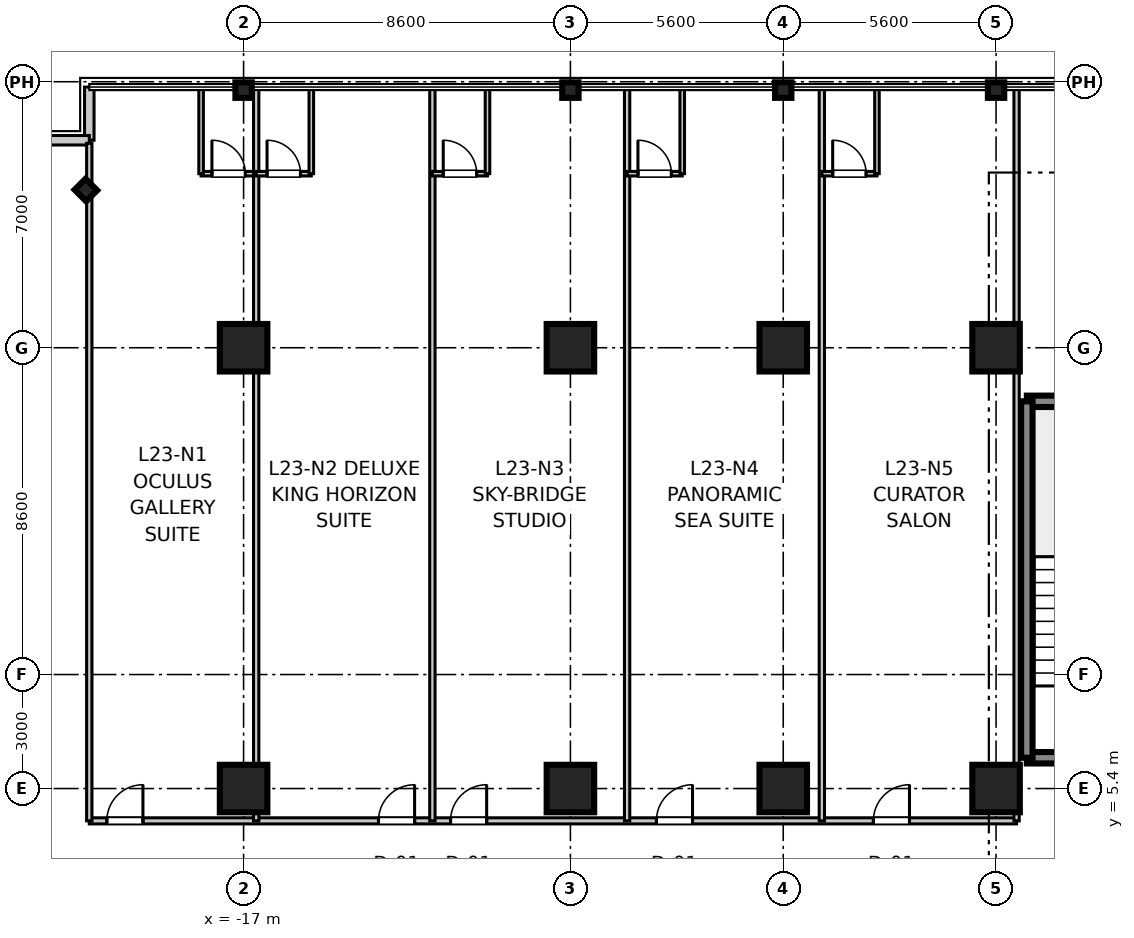
"""IFC4 building model, lengths in metres.
Left out: names, types, materials, properties, quantities, classifications, styles, units other than length and angle.
Written with IfcOpenShell. Run it as: python <this file> out.ifc"""

import sys

from ifc_helpers import new_model, si_unit, direction, frame, frame_2d, origin, origin_2d, place, context, subcontext, project, spatial, rectangle, i_section, extrude, source, transform, mapped, element, fill, save


model = new_model("IFC4")
c1 = context("Model", 3, precision=1e-05, world=origin(), true_north=direction((0.0, 1.0)))
c2 = subcontext(c1, "Body", "Model", "MODEL_VIEW")
j1 = project(units=[si_unit("LENGTHUNIT", "METRE"), si_unit("PLANEANGLEUNIT", "RADIAN")], contexts=[c1])
p1 = place(None, origin())
s1 = spatial("IfcSite", under=j1, at=p1, CompositionType="ELEMENT")
p2 = place(p1, origin())
s2 = spatial("IfcBuilding", under=s1, at=p2, CompositionType="ELEMENT")
p3 = place(p2, frame((0.0, 0.0, 95.6)))
s3 = spatial("IfcBuildingStorey", under=s2, at=p3, CompositionType="ELEMENT", Elevation=95.6)
m1 = source(origin(), c2, "Body", "SweptSolid", [
    extrude(rectangle(XDim=1.25, YDim=1.25, at=origin_2d()), origin(), (0.0, 0.0, 1.0), 3.605),
])
for number, where, z_axis, x_axis in (
    (1, (-17.0, 5.4, 0.0), (0.0, 0.0, 1.0), (1.0, 0.0, 0.0)),
    (2, (-17.0, 17.0, 0.0), (0.0, 0.0, 1.0), (1.0, 0.0, 0.0)),
    (3, (-8.4, 5.4, 0.0), (0.0, 0.0, 1.0), (1.0, 0.0, 0.0)),
    (4, (-8.4, 17.0, 0.0), (0.0, 0.0, 1.0), (1.0, 0.0, 0.0)),
    (5, (-2.8, 5.4, 0.0), (0.0, 0.0, 1.0), (1.0, 0.0, 0.0)),
    (6, (-2.8, 17.0, 0.0), (0.0, 0.0, 1.0), (1.0, 0.0, 0.0)),
    (7, (2.8, 5.4, 0.0), (0.0, 0.0, 1.0), (1.0, 0.0, 0.0)),
    (8, (2.8, 17.0, 0.0), (0.0, 0.0, 1.0), (1.0, 0.0, 0.0)),
):
    element("IfcColumn", number, at=place(p3, frame(where, z_axis=z_axis, x_axis=x_axis)), inside=s3, PredefinedType="COLUMN", context=c2, shape_type="MappedRepresentation", body=[
        mapped(m1, transform((0.0, 0.0, 0.0), scale=1.0)),
    ])
m2 = source(origin(), c2, "Body", "SweptSolid", [
    extrude(i_section(OverallWidth=0.409, OverallDepth=0.43, WebThickness=0.021, FlangeThickness=0.034, at=origin_2d()), origin(), (0.0, 0.0, 1.0), 3.605),
])
for number, where, z_axis, x_axis in (
    (9, (-17.0, 23.78, 0.0), (0.0, 0.0, 1.0), (0.0, 1.0, 0.0)),
    (10, (-8.4, 23.78, 0.0), (0.0, 0.0, 1.0), (0.0, 1.0, 0.0)),
    (11, (-2.8, 23.78, 0.0), (0.0, 0.0, 1.0), (0.0, 1.0, 0.0)),
    (12, (2.8, 23.78, 0.0), (0.0, 0.0, 1.0), (0.0, 1.0, 0.0)),
    (13, (-21.15, 21.15, 0.0), (0.0, 0.0, 1.0), (0.707, 0.707, 0.0)),
):
    element("IfcColumn", number, at=place(p3, frame(where, z_axis=z_axis, x_axis=x_axis)), inside=s3, PredefinedType="COLUMN", context=c2, shape_type="MappedRepresentation", body=[
        mapped(m2, transform((0.0, 0.0, 0.0), scale=1.0)),
    ])
m3 = source(origin(), c2, "Body", "SweptSolid", [
    extrude(rectangle(XDim=3.98, YDim=0.3, at=frame_2d((1.99, 0.0))), origin(), (0.0, 0.0, 1.0), 3.38),
])
for number, where, z_axis, x_axis in (
    (14, (3.61, 6.21, 0.0), (0.0, 0.0, 1.0), (1.0, 0.0, 0.0)),
    (15, (3.61, 15.59, 0.0), (0.0, 0.0, 1.0), (1.0, 0.0, 0.0)),
):
    element("IfcWall", number, at=place(p3, frame(where, z_axis=z_axis, x_axis=x_axis)), inside=s3, PredefinedType="SHEAR", context=c2, shape_type="MappedRepresentation", body=[
        mapped(m3, transform((0.0, 0.0, 0.0), scale=1.0)),
    ])
m4 = source(origin(), c2, "Body", "SweptSolid", [
    extrude(rectangle(XDim=9.38, YDim=0.3, at=frame_2d((4.69, 0.0))), origin(), (0.0, 0.0, 1.0), 3.38),
])
p4 = place(p3, frame((3.61, 6.21, 0.0), z_axis=(0.0, 0.0, 1.0), x_axis=(0.0, 1.0, 0.0)))
e16 = element("IfcWall", 16, at=p4, inside=s3, PredefinedType="SHEAR", context=c2, shape_type="MappedRepresentation", body=[
    mapped(m4, transform((0.0, 0.0, 0.0), scale=1.0)),
])
m5 = source(origin(), c2, "Body", "SweptSolid", [
    extrude(rectangle(XDim=1.4, YDim=0.25, at=frame_2d((0.7, 0.0))), origin(), (0.0, 0.0, 1.0), 3.38),
])
p5 = place(p3, frame((-21.06, 22.46, 0.0), z_axis=(0.0, 0.0, 1.0), x_axis=(0.0, 1.0, 0.0)))
e17 = element("IfcWall", 17, at=p5, inside=s3, PredefinedType="STANDARD", context=c2, shape_type="MappedRepresentation", body=[
    mapped(m5, transform((0.0, 0.0, 0.0), scale=1.0)),
])
m6 = source(origin(), c2, "Body", "SweptSolid", [
    extrude(rectangle(XDim=1.4, YDim=0.25, at=frame_2d((0.7, 0.0))), origin(), (0.0, 0.0, 1.0), 3.38),
])
p6 = place(p3, frame((-22.46, 22.46, 0.0), z_axis=(0.0, 0.0, 1.0), x_axis=(1.0, 0.0, 0.0)))
e18 = element("IfcWall", 18, at=p6, inside=s3, PredefinedType="STANDARD", context=c2, shape_type="MappedRepresentation", body=[
    mapped(m6, transform((0.0, 0.0, 0.0), scale=1.0)),
])
m7 = source(origin(), c2, "Body", "SweptSolid", [
    extrude(rectangle(XDim=24.4, YDim=0.16, at=frame_2d((12.2, 0.0))), origin(), (0.0, 0.0, 1.0), 2.72),
])
p7 = place(p3, frame((-21.06, 4.55, 0.0), z_axis=(0.0, 0.0, 1.0), x_axis=(1.0, 0.0, 0.0)))
e19 = element("IfcWall", 19, at=p7, inside=s3, PredefinedType="PARTITIONING", context=c2, shape_type="MappedRepresentation", body=[
    mapped(m7, transform((0.0, 0.0, 0.0), scale=1.0)),
])
p8 = place(p7, frame((0.462, 0.0, 0.0)))
e20 = element("IfcOpeningElement", 20, at=p8, cuts=e19, PredefinedType="OPENING", context=c2, shape_type="SweptSolid", body=[
    extrude(rectangle(XDim=0.95, YDim=2.1, at=frame_2d((0.475, 1.05))), frame((0.0, 0.09, 0.0), z_axis=(0.0, -1.0, 0.0), x_axis=(1.0, 0.0, 0.0)), (0.0, 0.0, 1.0), 0.18),
])
p9 = place(p7, frame((7.61, 0.0, 0.0)))
e21 = element("IfcOpeningElement", 21, at=p9, cuts=e19, PredefinedType="OPENING", context=c2, shape_type="SweptSolid", body=[
    extrude(rectangle(XDim=0.95, YDim=2.1, at=frame_2d((0.475, 1.05))), frame((0.0, 0.09, 0.0), z_axis=(0.0, -1.0, 0.0), x_axis=(1.0, 0.0, 0.0)), (0.0, 0.0, 1.0), 0.18),
])
p10 = place(p7, frame((9.506, 0.0, 0.0)))
e22 = element("IfcOpeningElement", 22, at=p10, cuts=e19, PredefinedType="OPENING", context=c2, shape_type="SweptSolid", body=[
    extrude(rectangle(XDim=0.95, YDim=2.1, at=frame_2d((0.475, 1.05))), frame((0.0, 0.09, 0.0), z_axis=(0.0, -1.0, 0.0), x_axis=(1.0, 0.0, 0.0)), (0.0, 0.0, 1.0), 0.18),
])
p11 = place(p7, frame((14.923, 0.0, 0.0)))
e23 = element("IfcOpeningElement", 23, at=p11, cuts=e19, PredefinedType="OPENING", context=c2, shape_type="SweptSolid", body=[
    extrude(rectangle(XDim=0.95, YDim=2.1, at=frame_2d((0.475, 1.05))), frame((0.0, 0.09, 0.0), z_axis=(0.0, -1.0, 0.0), x_axis=(1.0, 0.0, 0.0)), (0.0, 0.0, 1.0), 0.18),
])
p12 = place(p7, frame((20.632, 0.0, 0.0)))
e24 = element("IfcOpeningElement", 24, at=p12, cuts=e19, PredefinedType="OPENING", context=c2, shape_type="SweptSolid", body=[
    extrude(rectangle(XDim=0.95, YDim=2.1, at=frame_2d((0.475, 1.05))), frame((0.0, 0.09, 0.0), z_axis=(0.0, -1.0, 0.0), x_axis=(1.0, 0.0, 0.0)), (0.0, 0.0, 1.0), 0.18),
])
m8 = source(origin(), c2, "Body", "SweptSolid", [
    extrude(rectangle(XDim=17.83, YDim=0.14, at=frame_2d((8.915, 0.0))), origin(), (0.0, 0.0, 1.0), 2.72),
])
p13 = place(p3, frame((-21.06, 4.55, 0.0), z_axis=(0.0, 0.0, 1.0), x_axis=(0.0, 1.0, 0.0)))
e25 = element("IfcWall", 25, at=p13, inside=s3, PredefinedType="PARTITIONING", context=c2, shape_type="MappedRepresentation", body=[
    mapped(m8, transform((0.0, 0.0, 0.0), scale=1.0)),
])
m9 = source(origin(), c2, "Body", "SweptSolid", [
    extrude(rectangle(XDim=19.25, YDim=0.14, at=frame_2d((9.625, 0.0))), origin(), (0.0, 0.0, 1.0), 2.72),
])
p14 = place(p3, frame((3.34, 4.55, 0.0), z_axis=(0.0, 0.0, 1.0), x_axis=(0.0, 1.0, 0.0)))
e26 = element("IfcWall", 26, at=p14, inside=s3, PredefinedType="PARTITIONING", context=c2, shape_type="MappedRepresentation", body=[
    mapped(m9, transform((0.0, 0.0, 0.0), scale=1.0)),
])
m10 = source(origin(), c2, "Body", "SweptSolid", [
    extrude(rectangle(XDim=1.45, YDim=0.12, at=frame_2d((0.725, 0.0))), origin(), (0.0, 0.0, 1.0), 2.72),
])
p15 = place(p3, frame((-18.118, 21.58, 0.0), z_axis=(0.0, 0.0, 1.0), x_axis=(1.0, 0.0, 0.0)))
e27 = element("IfcWall", 27, at=p15, inside=s3, PredefinedType="PARTITIONING", context=c2, shape_type="MappedRepresentation", body=[
    mapped(m10, transform((0.0, 0.0, 0.0), scale=1.0)),
])
p16 = place(p15, frame((0.285, 0.0, 0.0)))
e28 = element("IfcOpeningElement", 28, at=p16, cuts=e27, PredefinedType="OPENING", context=c2, shape_type="SweptSolid", body=[
    extrude(rectangle(XDim=0.88, YDim=2.1, at=frame_2d((0.44, 1.05))), frame((0.0, 0.07, 0.0), z_axis=(0.0, -1.0, 0.0), x_axis=(1.0, 0.0, 0.0)), (0.0, 0.0, 1.0), 0.14),
])
m11 = source(origin(), c2, "Body", "SweptSolid", [
    extrude(rectangle(XDim=2.22, YDim=0.12, at=frame_2d((1.11, 0.0))), origin(), (0.0, 0.0, 1.0), 2.72),
])
p17 = place(p3, frame((-18.118, 21.58, 0.0), z_axis=(0.0, 0.0, 1.0), x_axis=(0.0, 1.0, 0.0)))
e29 = element("IfcWall", 29, at=p17, inside=s3, PredefinedType="PARTITIONING", context=c2, shape_type="MappedRepresentation", body=[
    mapped(m11, transform((0.0, 0.0, 0.0), scale=1.0)),
])
p18 = place(p3, frame((-16.668, 4.55, 0.0), z_axis=(0.0, 0.0, 1.0), x_axis=(0.0, 1.0, 0.0)))
e30 = element("IfcWall", 30, at=p18, inside=s3, PredefinedType="PARTITIONING", context=c2, shape_type="MappedRepresentation", body=[
    mapped(m9, transform((0.0, 0.0, 0.0), scale=1.0)),
])
p19 = place(p3, frame((-16.668, 21.58, 0.0), z_axis=(0.0, 0.0, 1.0), x_axis=(1.0, 0.0, 0.0)))
e31 = element("IfcWall", 31, at=p19, inside=s3, PredefinedType="PARTITIONING", context=c2, shape_type="MappedRepresentation", body=[
    mapped(m10, transform((0.0, 0.0, 0.0), scale=1.0)),
])
p20 = place(p19, frame((0.285, 0.0, 0.0)))
e32 = element("IfcOpeningElement", 32, at=p20, cuts=e31, PredefinedType="OPENING", context=c2, shape_type="SweptSolid", body=[
    extrude(rectangle(XDim=0.88, YDim=2.1, at=frame_2d((0.44, 1.05))), frame((0.0, 0.07, 0.0), z_axis=(0.0, -1.0, 0.0), x_axis=(1.0, 0.0, 0.0)), (0.0, 0.0, 1.0), 0.14),
])
p21 = place(p3, frame((-15.218, 21.58, 0.0), z_axis=(0.0, 0.0, 1.0), x_axis=(0.0, 1.0, 0.0)))
e33 = element("IfcWall", 33, at=p21, inside=s3, PredefinedType="PARTITIONING", context=c2, shape_type="MappedRepresentation", body=[
    mapped(m11, transform((0.0, 0.0, 0.0), scale=1.0)),
])
p22 = place(p3, frame((-12.032, 4.55, 0.0), z_axis=(0.0, 0.0, 1.0), x_axis=(0.0, 1.0, 0.0)))
e34 = element("IfcWall", 34, at=p22, inside=s3, PredefinedType="PARTITIONING", context=c2, shape_type="MappedRepresentation", body=[
    mapped(m9, transform((0.0, 0.0, 0.0), scale=1.0)),
])
p23 = place(p3, frame((-12.032, 21.58, 0.0), z_axis=(0.0, 0.0, 1.0), x_axis=(1.0, 0.0, 0.0)))
e35 = element("IfcWall", 35, at=p23, inside=s3, PredefinedType="PARTITIONING", context=c2, shape_type="MappedRepresentation", body=[
    mapped(m10, transform((0.0, 0.0, 0.0), scale=1.0)),
])
p24 = place(p23, frame((0.285, 0.0, 0.0)))
e36 = element("IfcOpeningElement", 36, at=p24, cuts=e35, PredefinedType="OPENING", context=c2, shape_type="SweptSolid", body=[
    extrude(rectangle(XDim=0.88, YDim=2.1, at=frame_2d((0.44, 1.05))), frame((0.0, 0.07, 0.0), z_axis=(0.0, -1.0, 0.0), x_axis=(1.0, 0.0, 0.0)), (0.0, 0.0, 1.0), 0.14),
])
p25 = place(p3, frame((-10.582, 21.58, 0.0), z_axis=(0.0, 0.0, 1.0), x_axis=(0.0, 1.0, 0.0)))
e37 = element("IfcWall", 37, at=p25, inside=s3, PredefinedType="PARTITIONING", context=c2, shape_type="MappedRepresentation", body=[
    mapped(m11, transform((0.0, 0.0, 0.0), scale=1.0)),
])
p26 = place(p3, frame((-6.908, 4.55, 0.0), z_axis=(0.0, 0.0, 1.0), x_axis=(0.0, 1.0, 0.0)))
e38 = element("IfcWall", 38, at=p26, inside=s3, PredefinedType="PARTITIONING", context=c2, shape_type="MappedRepresentation", body=[
    mapped(m9, transform((0.0, 0.0, 0.0), scale=1.0)),
])
p27 = place(p3, frame((-6.908, 21.58, 0.0), z_axis=(0.0, 0.0, 1.0), x_axis=(1.0, 0.0, 0.0)))
e39 = element("IfcWall", 39, at=p27, inside=s3, PredefinedType="PARTITIONING", context=c2, shape_type="MappedRepresentation", body=[
    mapped(m10, transform((0.0, 0.0, 0.0), scale=1.0)),
])
p28 = place(p27, frame((0.285, 0.0, 0.0)))
e40 = element("IfcOpeningElement", 40, at=p28, cuts=e39, PredefinedType="OPENING", context=c2, shape_type="SweptSolid", body=[
    extrude(rectangle(XDim=0.88, YDim=2.1, at=frame_2d((0.44, 1.05))), frame((0.0, 0.07, 0.0), z_axis=(0.0, -1.0, 0.0), x_axis=(1.0, 0.0, 0.0)), (0.0, 0.0, 1.0), 0.14),
])
p29 = place(p3, frame((-5.458, 21.58, 0.0), z_axis=(0.0, 0.0, 1.0), x_axis=(0.0, 1.0, 0.0)))
e41 = element("IfcWall", 41, at=p29, inside=s3, PredefinedType="PARTITIONING", context=c2, shape_type="MappedRepresentation", body=[
    mapped(m11, transform((0.0, 0.0, 0.0), scale=1.0)),
])
p30 = place(p3, frame((-1.784, 4.55, 0.0), z_axis=(0.0, 0.0, 1.0), x_axis=(0.0, 1.0, 0.0)))
e42 = element("IfcWall", 42, at=p30, inside=s3, PredefinedType="PARTITIONING", context=c2, shape_type="MappedRepresentation", body=[
    mapped(m9, transform((0.0, 0.0, 0.0), scale=1.0)),
])
p31 = place(p3, frame((-1.784, 21.58, 0.0), z_axis=(0.0, 0.0, 1.0), x_axis=(1.0, 0.0, 0.0)))
e43 = element("IfcWall", 43, at=p31, inside=s3, PredefinedType="PARTITIONING", context=c2, shape_type="MappedRepresentation", body=[
    mapped(m10, transform((0.0, 0.0, 0.0), scale=1.0)),
])
p32 = place(p31, frame((0.285, 0.0, 0.0)))
e44 = element("IfcOpeningElement", 44, at=p32, cuts=e43, PredefinedType="OPENING", context=c2, shape_type="SweptSolid", body=[
    extrude(rectangle(XDim=0.88, YDim=2.1, at=frame_2d((0.44, 1.05))), frame((0.0, 0.07, 0.0), z_axis=(0.0, -1.0, 0.0), x_axis=(1.0, 0.0, 0.0)), (0.0, 0.0, 1.0), 0.14),
])
p33 = place(p3, frame((-0.334, 21.58, 0.0), z_axis=(0.0, 0.0, 1.0), x_axis=(0.0, 1.0, 0.0)))
e45 = element("IfcWall", 45, at=p33, inside=s3, PredefinedType="PARTITIONING", context=c2, shape_type="MappedRepresentation", body=[
    mapped(m11, transform((0.0, 0.0, 0.0), scale=1.0)),
])
m12 = source(origin(), c2, "Body", "SweptSolid", [
    extrude(rectangle(XDim=0.88, YDim=2.1, at=frame_2d((0.44, 1.05))), frame((0.0, 0.025, 0.0), z_axis=(0.0, -1.0, 0.0), x_axis=(1.0, 0.0, 0.0)), (0.0, 0.0, 1.0), 0.05),
])
p34 = place(p16, origin())
e46 = element("IfcDoor", 46, at=p34, inside=s3, OperationType="SINGLE_SWING_LEFT", PredefinedType="DOOR", context=c2, shape_type="MappedRepresentation", body=[
    mapped(m12, transform((0.0, 0.0, 0.0), scale=1.0)),
])
fill(e28, e46)
m13 = source(origin(), c2, "Body", "SweptSolid", [
    extrude(rectangle(XDim=0.95, YDim=2.1, at=frame_2d((0.475, 1.05))), frame((0.0, 0.025, 0.0), z_axis=(0.0, -1.0, 0.0), x_axis=(1.0, 0.0, 0.0)), (0.0, 0.0, 1.0), 0.05),
])
p35 = place(p8, origin())
e47 = element("IfcDoor", 47, at=p35, inside=s3, OperationType="SINGLE_SWING_RIGHT", PredefinedType="DOOR", context=c2, shape_type="MappedRepresentation", body=[
    mapped(m13, transform((0.0, 0.0, 0.0), scale=1.0)),
])
fill(e20, e47)
p36 = place(p20, origin())
e48 = element("IfcDoor", 48, at=p36, inside=s3, OperationType="SINGLE_SWING_LEFT", PredefinedType="DOOR", context=c2, shape_type="MappedRepresentation", body=[
    mapped(m12, transform((0.0, 0.0, 0.0), scale=1.0)),
])
fill(e32, e48)
p37 = place(p9, origin())
e49 = element("IfcDoor", 49, at=p37, inside=s3, OperationType="SINGLE_SWING_RIGHT", PredefinedType="DOOR", context=c2, shape_type="MappedRepresentation", body=[
    mapped(m13, transform((0.0, 0.0, 0.0), scale=1.0)),
])
fill(e21, e49)
p38 = place(p24, origin())
e50 = element("IfcDoor", 50, at=p38, inside=s3, OperationType="SINGLE_SWING_LEFT", PredefinedType="DOOR", context=c2, shape_type="MappedRepresentation", body=[
    mapped(m12, transform((0.0, 0.0, 0.0), scale=1.0)),
])
fill(e36, e50)
p39 = place(p10, origin())
e51 = element("IfcDoor", 51, at=p39, inside=s3, OperationType="SINGLE_SWING_RIGHT", PredefinedType="DOOR", context=c2, shape_type="MappedRepresentation", body=[
    mapped(m13, transform((0.0, 0.0, 0.0), scale=1.0)),
])
fill(e22, e51)
p40 = place(p28, origin())
e52 = element("IfcDoor", 52, at=p40, inside=s3, OperationType="SINGLE_SWING_LEFT", PredefinedType="DOOR", context=c2, shape_type="MappedRepresentation", body=[
    mapped(m12, transform((0.0, 0.0, 0.0), scale=1.0)),
])
fill(e40, e52)
p41 = place(p11, origin())
e53 = element("IfcDoor", 53, at=p41, inside=s3, OperationType="SINGLE_SWING_RIGHT", PredefinedType="DOOR", context=c2, shape_type="MappedRepresentation", body=[
    mapped(m13, transform((0.0, 0.0, 0.0), scale=1.0)),
])
fill(e23, e53)
p42 = place(p32, origin())
e54 = element("IfcDoor", 54, at=p42, inside=s3, OperationType="SINGLE_SWING_LEFT", PredefinedType="DOOR", context=c2, shape_type="MappedRepresentation", body=[
    mapped(m12, transform((0.0, 0.0, 0.0), scale=1.0)),
])
fill(e44, e54)
p43 = place(p12, origin())
e55 = element("IfcDoor", 55, at=p43, inside=s3, OperationType="SINGLE_SWING_RIGHT", PredefinedType="DOOR", context=c2, shape_type="MappedRepresentation", body=[
    mapped(m13, transform((0.0, 0.0, 0.0), scale=1.0)),
])
fill(e24, e55)
save(model, sys.argv[1])
